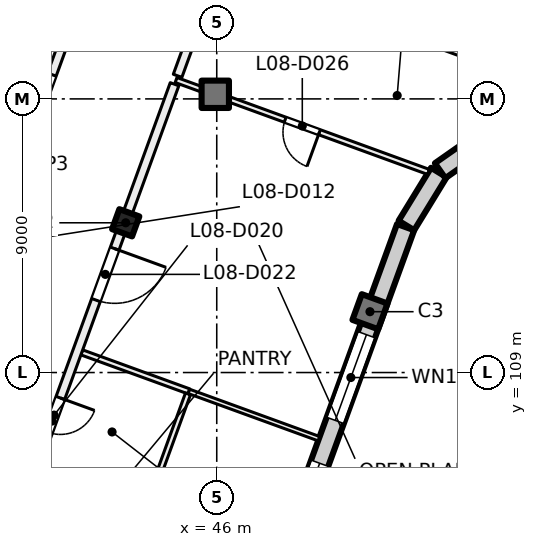
"""IFC4 building model, lengths in metres.
Left out: names, types, materials, properties, quantities, classifications, styles, units other than length and angle.
Written with IfcOpenShell. Run it as: python <this file> out.ifc"""

import sys

from ifc_helpers import new_model, si_unit, direction, frame, frame_2d, origin, origin_2d, place, context, subcontext, project, spatial, rectangle, extrude, element, fill, save


model = new_model("IFC4")
c1 = context("Model", 3, precision=1e-05, world=origin(), true_north=direction((0.0, 1.0)))
c2 = subcontext(c1, "Body", "Model", "MODEL_VIEW")
j1 = project(units=[si_unit("LENGTHUNIT", "METRE"), si_unit("PLANEANGLEUNIT", "RADIAN")], contexts=[c1])
p1 = place(None, origin())
s1 = spatial("IfcSite", under=j1, at=p1, CompositionType="ELEMENT")
p2 = place(p1, origin())
s2 = spatial("IfcBuilding", under=s1, at=p2, CompositionType="ELEMENT")
p3 = place(p2, frame((0.0, 0.0, 39.5)))
s3 = spatial("IfcBuildingStorey", under=s2, at=p3, CompositionType="ELEMENT", Elevation=39.5)
p4 = place(p3, frame((45.952, 118.152, 0.0), z_axis=(0.0, 0.0, 1.0), x_axis=(1.0, 0.0, 0.0)))
e1 = element("IfcColumn", 1, at=p4, inside=s3, PredefinedType="COLUMN", context=c2, shape_type="SweptSolid", body=[
    extrude(rectangle(XDim=0.9, YDim=0.9, at=origin_2d()), origin(), (0.0, 0.0, 1.0), 4.0),
])
p5 = place(p3, frame((43.006, 113.925, 0.0), z_axis=(0.0, 0.0, 1.0), x_axis=(-0.342020143326, -0.939692620786, 0.0)))
e2 = element("IfcColumn", 2, at=p5, inside=s3, PredefinedType="COLUMN", context=c2, shape_type="SweptSolid", body=[
    extrude(rectangle(XDim=0.7, YDim=0.7, at=origin_2d()), origin(), (0.0, 0.0, 1.0), 4.0),
])
p6 = place(p3, frame((51.04, 111.001, 0.0), z_axis=(0.0, 0.0, 1.0), x_axis=(-0.342020143326, -0.939692620786, 0.0)))
e3 = element("IfcColumn", 3, at=p6, inside=s3, PredefinedType="COLUMN", context=c2, shape_type="SweptSolid", body=[
    extrude(rectangle(XDim=0.9, YDim=0.9, at=origin_2d()), origin(), (0.0, 0.0, 1.0), 4.0),
])
p7 = place(p3, frame((52.212, 113.783, 0.0), z_axis=(0.0, 0.0, 1.0), x_axis=(-0.34202521188, -0.939690775968, 0.0)))
e4 = element("IfcWall", 4, at=p7, inside=s3, PredefinedType="SOLIDWALL", context=c2, shape_type="SweptSolid", body=[
    extrude(rectangle(XDim=21.745, YDim=0.6, at=frame_2d((10.873, 0.0))), origin(), (0.0, 0.0, 1.0), 3.625),
])
p8 = place(p7, frame((3.765, 0.0, 0.9)))
e5 = element("IfcOpeningElement", 5, at=p8, cuts=e4, PredefinedType="OPENING", context=c2, shape_type="SweptSolid", body=[
    extrude(rectangle(XDim=3.0, YDim=2.4, at=frame_2d((1.5, 1.2))), frame((0.0, 0.31, 0.0), z_axis=(0.0, -1.0, 0.0), x_axis=(1.0, 0.0, 0.0)), (0.0, 0.0, 1.0), 0.62),
])
p9 = place(p7, frame((8.265, 0.0, 0.9)))
e6 = element("IfcOpeningElement", 6, at=p9, cuts=e4, PredefinedType="OPENING", context=c2, shape_type="SweptSolid", body=[
    extrude(rectangle(XDim=3.0, YDim=2.4, at=frame_2d((1.5, 1.2))), frame((0.0, 0.31, 0.0), z_axis=(0.0, -1.0, 0.0), x_axis=(1.0, 0.0, 0.0)), (0.0, 0.0, 1.0), 0.62),
])
p10 = place(p7, frame((12.765, 0.0, 0.9)))
e7 = element("IfcOpeningElement", 7, at=p10, cuts=e4, PredefinedType="OPENING", context=c2, shape_type="SweptSolid", body=[
    extrude(rectangle(XDim=3.0, YDim=2.4, at=frame_2d((1.5, 1.2))), frame((0.0, 0.31, 0.0), z_axis=(0.0, -1.0, 0.0), x_axis=(1.0, 0.0, 0.0)), (0.0, 0.0, 1.0), 0.62),
])
p11 = place(p7, frame((17.265, 0.0, 0.9)))
e8 = element("IfcOpeningElement", 8, at=p11, cuts=e4, PredefinedType="OPENING", context=c2, shape_type="SweptSolid", body=[
    extrude(rectangle(XDim=3.0, YDim=2.4, at=frame_2d((1.5, 1.2))), frame((0.0, 0.31, 0.0), z_axis=(0.0, -1.0, 0.0), x_axis=(1.0, 0.0, 0.0)), (0.0, 0.0, 1.0), 0.62),
])
p12 = place(p3, frame((53.305, 115.578, 0.0), z_axis=(0.0, 0.0, 1.0), x_axis=(-0.522402266438, -0.852699168535, 0.0)))
e9 = element("IfcWall", 9, at=p12, inside=s3, PredefinedType="SOLIDWALL", context=c2, shape_type="SweptSolid", body=[
    extrude(rectangle(XDim=2.042, YDim=0.6, at=frame_2d((1.021, 0.0))), origin(), (0.0, 0.0, 1.0), 3.625),
])
p13 = place(p3, frame((55.062, 116.839, 0.0), z_axis=(0.0, 0.0, 1.0), x_axis=(-0.819122269495, -0.573618956815, 0.0)))
e10 = element("IfcWall", 10, at=p13, inside=s3, PredefinedType="SOLIDWALL", context=c2, shape_type="SweptSolid", body=[
    extrude(rectangle(XDim=2.092, YDim=0.6, at=frame_2d((1.046, 0.0))), origin(), (0.0, 0.0, 1.0), 3.625),
])
p14 = place(p3, frame((32.881, 97.657, 0.0), z_axis=(0.0, 0.0, 1.0), x_axis=(0.342017360004, 0.939693633828, 0.0)))
e11 = element("IfcWall", 11, at=p14, inside=s3, PredefinedType="PARTITIONING", context=c2, shape_type="SweptSolid", body=[
    extrude(rectangle(XDim=34.516, YDim=0.3, at=frame_2d((17.258, 0.0))), origin(), (0.0, 0.0, 1.0), 3.625),
])
p15 = place(p14, frame((4.275, 0.0, 0.0)))
e12 = element("IfcOpeningElement", 12, at=p15, cuts=e11, PredefinedType="OPENING", context=c2, shape_type="SweptSolid", body=[
    extrude(rectangle(XDim=1.2, YDim=2.1, at=frame_2d((0.6, 1.05))), frame((0.0, 0.16, 0.0), z_axis=(0.0, -1.0, 0.0), x_axis=(1.0, 0.0, 0.0)), (0.0, 0.0, 1.0), 0.32),
])
p16 = place(p14, frame((16.0, 0.0, 0.0)))
e13 = element("IfcOpeningElement", 13, at=p16, cuts=e11, PredefinedType="OPENING", context=c2, shape_type="SweptSolid", body=[
    extrude(rectangle(XDim=1.0, YDim=2.1, at=frame_2d((0.5, 1.05))), frame((0.0, 0.16, 0.0), z_axis=(0.0, -1.0, 0.0), x_axis=(1.0, 0.0, 0.0)), (0.0, 0.0, 1.0), 0.32),
])
p17 = place(p14, frame((21.5, 0.0, 0.0)))
e14 = element("IfcOpeningElement", 14, at=p17, cuts=e11, PredefinedType="OPENING", context=c2, shape_type="SweptSolid", body=[
    extrude(rectangle(XDim=1.0, YDim=2.1, at=frame_2d((0.5, 1.05))), frame((0.0, 0.16, 0.0), z_axis=(0.0, -1.0, 0.0), x_axis=(1.0, 0.0, 0.0)), (0.0, 0.0, 1.0), 0.32),
])
p18 = place(p3, frame((41.561, 109.663, 0.0), z_axis=(0.0, 0.0, 1.0), x_axis=(0.939610777088, -0.34224492338, 0.0)))
e15 = element("IfcWall", 15, at=p18, inside=s3, PredefinedType="PARTITIONING", context=c2, shape_type="SweptSolid", body=[
    extrude(rectangle(XDim=3.749, YDim=0.175, at=frame_2d((1.875, 0.0))), origin(), (0.0, 0.0, 1.0), 3.625),
])
p19 = place(p3, frame((52.965, 115.598, 0.0), z_axis=(0.0, 0.0, 1.0), x_axis=(-0.939650555598, 0.342135694374, 0.0)))
e16 = element("IfcWall", 16, at=p19, inside=s3, PredefinedType="PARTITIONING", context=c2, shape_type="SweptSolid", body=[
    extrude(rectangle(XDim=8.836, YDim=0.175, at=frame_2d((4.418, 0.0))), origin(), (0.0, 0.0, 1.0), 3.625),
])
p20 = place(p19, frame((3.818, 0.0, 0.0)))
e17 = element("IfcOpeningElement", 17, at=p20, cuts=e16, PredefinedType="OPENING", context=c2, shape_type="SweptSolid", body=[
    extrude(rectangle(XDim=1.2, YDim=2.1, at=frame_2d((0.6, 1.05))), frame((0.0, 0.097, 0.0), z_axis=(0.0, -1.0, 0.0), x_axis=(1.0, 0.0, 0.0)), (0.0, 0.0, 1.0), 0.195),
])
p21 = place(p3, frame((44.612, 118.483, 0.0), z_axis=(0.0, 0.0, 1.0), x_axis=(-0.342043123066, -0.939684256526, 0.0)))
e18 = element("IfcWall", 18, at=p21, inside=s3, PredefinedType="PARTITIONING", context=c2, shape_type="SweptSolid", body=[
    extrude(rectangle(XDim=23.582, YDim=0.3, at=frame_2d((11.791, 0.0))), origin(), (0.0, 0.0, 1.0), 3.625),
])
p22 = place(p21, frame((14.932, 0.0, 0.0)))
e19 = element("IfcOpeningElement", 19, at=p22, cuts=e18, PredefinedType="OPENING", context=c2, shape_type="SweptSolid", body=[
    extrude(rectangle(XDim=0.8, YDim=2.1, at=frame_2d((0.4, 1.05))), frame((0.0, 0.16, 0.0), z_axis=(0.0, -1.0, 0.0), x_axis=(1.0, 0.0, 0.0)), (0.0, 0.0, 1.0), 0.32),
])
p23 = place(p21, frame((10.982, 0.0, 0.0)))
e20 = element("IfcOpeningElement", 20, at=p23, cuts=e18, PredefinedType="OPENING", context=c2, shape_type="SweptSolid", body=[
    extrude(rectangle(XDim=1.2, YDim=2.1, at=frame_2d((0.6, 1.05))), frame((0.0, 0.16, 0.0), z_axis=(0.0, -1.0, 0.0), x_axis=(1.0, 0.0, 0.0)), (0.0, 0.0, 1.0), 0.32),
])
p24 = place(p21, frame((19.307, 0.0, 0.0)))
e21 = element("IfcOpeningElement", 21, at=p24, cuts=e18, PredefinedType="OPENING", context=c2, shape_type="SweptSolid", body=[
    extrude(rectangle(XDim=1.8, YDim=2.1, at=frame_2d((0.9, 1.05))), frame((0.0, 0.16, 0.0), z_axis=(0.0, -1.0, 0.0), x_axis=(1.0, 0.0, 0.0)), (0.0, 0.0, 1.0), 0.32),
])
p25 = place(p21, frame((5.756, 0.0, 0.0)))
e22 = element("IfcOpeningElement", 22, at=p25, cuts=e18, PredefinedType="OPENING", context=c2, shape_type="SweptSolid", body=[
    extrude(rectangle(XDim=1.8, YDim=2.1, at=frame_2d((0.9, 1.05))), frame((0.0, 0.16, 0.0), z_axis=(0.0, -1.0, 0.0), x_axis=(1.0, 0.0, 0.0)), (0.0, 0.0, 1.0), 0.32),
])
p26 = place(p3, frame((45.054, 108.298, 0.0), z_axis=(0.0, 0.0, 1.0), x_axis=(-0.34193405199, -0.939723951004, 0.0)))
e23 = element("IfcWall", 23, at=p26, inside=s3, PredefinedType="PARTITIONING", context=c2, shape_type="SweptSolid", body=[
    extrude(rectangle(XDim=4.413, YDim=0.175, at=frame_2d((2.207, 0.0))), origin(), (0.0, 0.0, 1.0), 3.625),
])
p27 = place(p3, frame((45.084, 108.38, 0.0), z_axis=(0.0, 0.0, 1.0), x_axis=(0.93972604571, -0.341928295136, 0.0)))
e24 = element("IfcWall", 24, at=p27, inside=s3, PredefinedType="PARTITIONING", context=c2, shape_type="SweptSolid", body=[
    extrude(rectangle(XDim=4.55, YDim=0.15, at=frame_2d((2.275, 0.0))), origin(), (0.0, 0.0, 1.0), 3.625),
])
p28 = place(p3, frame((47.314, 125.909, 0.0), z_axis=(0.0, 0.0, 1.0), x_axis=(-0.34198522802, -0.939705328183, 0.0)))
e25 = element("IfcWall", 25, at=p28, inside=s3, PredefinedType="PARTITIONING", context=c2, shape_type="SweptSolid", body=[
    extrude(rectangle(XDim=7.609, YDim=0.3, at=frame_2d((3.804, 0.0))), origin(), (0.0, 0.0, 1.0), 3.625),
])
p29 = place(p3, frame((54.32, 119.384, 0.0), z_axis=(0.0, 0.0, 1.0), x_axis=(-0.939632908118, 0.342184157994, 0.0)))
e26 = element("IfcWall", 26, at=p29, inside=s3, PredefinedType="PARTITIONING", context=c2, shape_type="SweptSolid", body=[
    extrude(rectangle(XDim=8.665, YDim=0.175, at=frame_2d((4.333, 0.0))), origin(), (0.0, 0.0, 1.0), 3.625),
])
p30 = place(p8, origin())
e27 = element("IfcWindow", 27, at=p30, inside=s3, PartitioningType="SINGLE_PANEL", PredefinedType="WINDOW", context=c2, shape_type="SweptSolid", body=[
    extrude(rectangle(XDim=3.0, YDim=2.4, at=frame_2d((1.5, 1.2))), frame((0.0, 0.03, 0.0), z_axis=(0.0, -1.0, 0.0), x_axis=(1.0, 0.0, 0.0)), (0.0, 0.0, 1.0), 0.06),
])
fill(e5, e27)
p31 = place(p9, origin())
e28 = element("IfcWindow", 28, at=p31, inside=s3, PartitioningType="SINGLE_PANEL", PredefinedType="WINDOW", context=c2, shape_type="SweptSolid", body=[
    extrude(rectangle(XDim=3.0, YDim=2.4, at=frame_2d((1.5, 1.2))), frame((0.0, 0.03, 0.0), z_axis=(0.0, -1.0, 0.0), x_axis=(1.0, 0.0, 0.0)), (0.0, 0.0, 1.0), 0.06),
])
fill(e6, e28)
p32 = place(p17, origin())
e29 = element("IfcDoor", 29, at=p32, inside=s3, OperationType="SINGLE_SWING_LEFT", PredefinedType="DOOR", context=c2, shape_type="SweptSolid", body=[
    extrude(rectangle(XDim=1.0, YDim=2.1, at=frame_2d((0.5, 1.05))), frame((0.0, 0.025, 0.0), z_axis=(0.0, -1.0, 0.0), x_axis=(1.0, 0.0, 0.0)), (0.0, 0.0, 1.0), 0.05),
])
fill(e14, e29)
p33 = place(p23, origin())
e30 = element("IfcDoor", 30, at=p33, inside=s3, OperationType="DOUBLE_DOOR_SINGLE_SWING", PredefinedType="DOOR", context=c2, shape_type="SweptSolid", body=[
    extrude(rectangle(XDim=1.2, YDim=2.1, at=frame_2d((0.6, 1.05))), frame((0.0, 0.025, 0.0), z_axis=(0.0, -1.0, 0.0), x_axis=(1.0, 0.0, 0.0)), (0.0, 0.0, 1.0), 0.05),
])
fill(e20, e30)
p34 = place(p25, origin())
e31 = element("IfcDoor", 31, at=p34, inside=s3, OperationType="DOUBLE_DOOR_SINGLE_SWING", PredefinedType="DOOR", context=c2, shape_type="SweptSolid", body=[
    extrude(rectangle(XDim=1.8, YDim=2.1, at=frame_2d((0.9, 1.05))), frame((0.0, 0.025, 0.0), z_axis=(0.0, -1.0, 0.0), x_axis=(1.0, 0.0, 0.0)), (0.0, 0.0, 1.0), 0.05),
])
fill(e22, e31)
p35 = place(p20, origin())
e32 = element("IfcDoor", 32, at=p35, inside=s3, OperationType="DOUBLE_DOOR_SINGLE_SWING", PredefinedType="DOOR", context=c2, shape_type="SweptSolid", body=[
    extrude(rectangle(XDim=1.2, YDim=2.1, at=frame_2d((0.6, 1.05))), frame((0.0, 0.025, 0.0), z_axis=(0.0, -1.0, 0.0), x_axis=(1.0, 0.0, 0.0)), (0.0, 0.0, 1.0), 0.05),
])
fill(e17, e32)
save(model, sys.argv[1])
